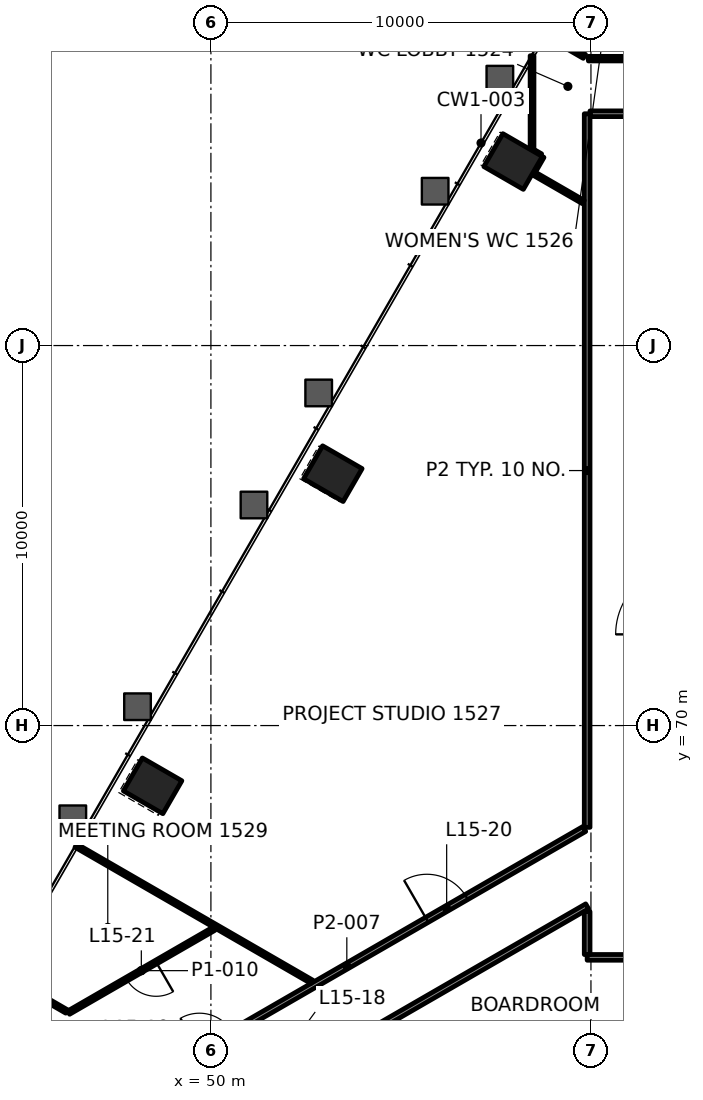
"""IFC4 building model, lengths in metres.
Left out: names, types, materials, properties, quantities, classifications, styles, units other than length and angle.
Written with IfcOpenShell. Run it as: python <this file> out.ifc"""

import sys

from ifc_helpers import new_model, si_unit, direction, frame, frame_2d, origin, origin_2d, place, context, subcontext, project, spatial, rectangle, extrude, element, fill, save


model = new_model("IFC4")
c1 = context("Model", 3, precision=1e-05, world=origin(), true_north=direction((0.0, 1.0)))
c2 = subcontext(c1, "Body", "Model", "MODEL_VIEW")
j1 = project(units=[si_unit("LENGTHUNIT", "METRE"), si_unit("PLANEANGLEUNIT", "RADIAN")], contexts=[c1])
p1 = place(None, origin())
s1 = spatial("IfcSite", under=j1, at=p1, CompositionType="ELEMENT")
p2 = place(p1, origin())
s2 = spatial("IfcBuilding", under=s1, at=p2, CompositionType="ELEMENT")
p3 = place(p2, frame((0.0, 0.0, 69.4)))
s3 = spatial("IfcBuildingStorey", under=s2, at=p3, CompositionType="ELEMENT", Elevation=69.4)
for number, where, z_axis, x_axis in (
    (1, (57.951, 84.843, -0.0), (0.0, 0.0, 1.0), (-0.5, -0.866, 0.0)),
    (2, (53.209, 76.628, -0.0), (0.0, 0.0, 1.0), (-0.5, -0.866, 0.0)),
    (3, (48.466, 68.414, -0.0), (0.0, 0.0, 1.0), (-0.5, -0.866, 0.0)),
):
    element("IfcColumn", number, at=place(p3, frame(where, z_axis=z_axis, x_axis=x_axis)), inside=s3, PredefinedType="COLUMN", context=c2, shape_type="SweptSolid", body=[
        extrude(rectangle(XDim=1.0, YDim=1.2, at=origin_2d()), origin(), (0.0, 0.0, 1.0), 4.2),
    ])
p4 = place(p3, frame((90.099, 63.9, 0.0), z_axis=(0.0, 0.0, 1.0), x_axis=(-1.0, 0.0, 0.0)))
e4 = element("IfcWall", 4, at=p4, inside=s3, PredefinedType="PARTITIONING", context=c2, shape_type="SweptSolid", body=[
    extrude(rectangle(XDim=30.199, YDim=0.15, at=frame_2d((15.1, 0.0))), origin(), (0.0, 0.0, 1.0), 3.4),
])
p5 = place(p4, frame((2.309, 0.0, 0.0)))
e5 = element("IfcOpeningElement", 5, at=p5, cuts=e4, PredefinedType="OPENING", context=c2, shape_type="SweptSolid", body=[
    extrude(rectangle(XDim=1.2, YDim=2.1, at=frame_2d((0.6, 1.05))), frame((0.0, 0.085, 0.0), z_axis=(0.0, -1.0, 0.0), x_axis=(1.0, 0.0, 0.0)), (0.0, 0.0, 1.0), 0.17),
])
p6 = place(p4, frame((14.599, 0.0, 0.0)))
e6 = element("IfcOpeningElement", 6, at=p6, cuts=e4, PredefinedType="OPENING", context=c2, shape_type="SweptSolid", body=[
    extrude(rectangle(XDim=1.0, YDim=2.1, at=frame_2d((0.5, 1.05))), frame((0.0, 0.085, 0.0), z_axis=(0.0, -1.0, 0.0), x_axis=(1.0, 0.0, 0.0)), (0.0, 0.0, 1.0), 0.17),
])
p7 = place(p4, frame((26.791, 0.0, 0.0)))
e7 = element("IfcOpeningElement", 7, at=p7, cuts=e4, PredefinedType="OPENING", context=c2, shape_type="SweptSolid", body=[
    extrude(rectangle(XDim=1.0, YDim=2.1, at=frame_2d((0.5, 1.05))), frame((0.0, 0.085, 0.0), z_axis=(0.0, -1.0, 0.0), x_axis=(1.0, 0.0, 0.0)), (0.0, 0.0, 1.0), 0.17),
])
p8 = place(p3, frame((59.976, 86.1, 0.0), z_axis=(0.0, 0.0, 1.0), x_axis=(1.0, 0.0, 0.0)))
e8 = element("IfcWall", 8, at=p8, inside=s3, PredefinedType="PARTITIONING", context=c2, shape_type="SweptSolid", body=[
    extrude(rectangle(XDim=9.649, YDim=0.15, at=frame_2d((4.825, 0.0))), origin(), (0.0, 0.0, 1.0), 3.4),
])
p9 = place(p8, frame((4.225, 0.0, 0.0)))
e9 = element("IfcOpeningElement", 9, at=p9, cuts=e8, PredefinedType="OPENING", context=c2, shape_type="SweptSolid", body=[
    extrude(rectangle(XDim=1.2, YDim=2.1, at=frame_2d((0.6, 1.05))), frame((0.0, 0.085, 0.0), z_axis=(0.0, -1.0, 0.0), x_axis=(1.0, 0.0, 0.0)), (0.0, 0.0, 1.0), 0.17),
])
p10 = place(p3, frame((67.181, 87.55, 0.0), z_axis=(0.0, 0.0, 1.0), x_axis=(-1.0, 0.0, 0.0)))
e10 = element("IfcWall", 10, at=p10, inside=s3, PredefinedType="PARTITIONING", context=c2, shape_type="SweptSolid", body=[
    extrude(rectangle(XDim=7.249, YDim=0.12, at=frame_2d((3.625, 0.0))), origin(), (0.0, 0.0, 1.0), 3.4),
])
p11 = place(p10, frame((1.388, 0.0, 0.0)))
e11 = element("IfcOpeningElement", 11, at=p11, cuts=e10, PredefinedType="OPENING", context=c2, shape_type="SweptSolid", body=[
    extrude(rectangle(XDim=0.9, YDim=2.1, at=frame_2d((0.45, 1.05))), frame((0.0, 0.07, 0.0), z_axis=(0.0, -1.0, 0.0), x_axis=(1.0, 0.0, 0.0)), (0.0, 0.0, 1.0), 0.14),
])
p12 = place(p10, frame((4.807, 0.0, 0.0)))
e12 = element("IfcOpeningElement", 12, at=p12, cuts=e10, PredefinedType="OPENING", context=c2, shape_type="SweptSolid", body=[
    extrude(rectangle(XDim=0.9, YDim=2.1, at=frame_2d((0.45, 1.05))), frame((0.0, 0.07, 0.0), z_axis=(0.0, -1.0, 0.0), x_axis=(1.0, 0.0, 0.0)), (0.0, 0.0, 1.0), 0.14),
])
p13 = place(p3, frame((59.9, 65.243, 0.0), z_axis=(0.0, 0.0, 1.0), x_axis=(-0.866023326939, -0.500003597184, 0.0)))
e13 = element("IfcWall", 13, at=p13, inside=s3, PredefinedType="PARTITIONING", context=c2, shape_type="SweptSolid", body=[
    extrude(rectangle(XDim=13.48, YDim=0.15, at=frame_2d((6.74, 0.0))), origin(), (0.0, 0.0, 1.0), 3.247),
])
p14 = place(p13, frame((9.643, 0.0, 0.0)))
e14 = element("IfcOpeningElement", 14, at=p14, cuts=e13, PredefinedType="OPENING", context=c2, shape_type="SweptSolid", body=[
    extrude(rectangle(XDim=1.2, YDim=2.1, at=frame_2d((0.6, 1.05))), frame((0.0, 0.085, 0.0), z_axis=(0.0, -1.0, 0.0), x_axis=(1.0, 0.0, 0.0)), (0.0, 0.0, 1.0), 0.17),
])
p15 = place(p3, frame((47.328, 60.063, 0.0), z_axis=(0.0, 0.0, 1.0), x_axis=(0.86602527873, 0.500000216601, 0.0)))
e15 = element("IfcWall", 15, at=p15, inside=s3, PredefinedType="PARTITIONING", context=c2, shape_type="SweptSolid", body=[
    extrude(rectangle(XDim=14.431, YDim=0.15, at=frame_2d((7.215, 0.0))), origin(), (0.0, 0.0, 1.0), 3.4),
])
p16 = place(p15, frame((2.737, 0.0, 0.0)))
e16 = element("IfcOpeningElement", 16, at=p16, cuts=e15, PredefinedType="OPENING", context=c2, shape_type="SweptSolid", body=[
    extrude(rectangle(XDim=1.0, YDim=2.1, at=frame_2d((0.5, 1.05))), frame((0.0, 0.085, 0.0), z_axis=(0.0, -1.0, 0.0), x_axis=(1.0, 0.0, 0.0)), (0.0, 0.0, 1.0), 0.17),
])
p17 = place(p15, frame((9.649, 0.0, 0.0)))
e17 = element("IfcOpeningElement", 17, at=p17, cuts=e15, PredefinedType="OPENING", context=c2, shape_type="SweptSolid", body=[
    extrude(rectangle(XDim=1.2, YDim=2.1, at=frame_2d((0.6, 1.05))), frame((0.0, 0.085, 0.0), z_axis=(0.0, -1.0, 0.0), x_axis=(1.0, 0.0, 0.0)), (0.0, 0.0, 1.0), 0.17),
])
p18 = place(p3, frame((50.082, 64.655, 0.0), z_axis=(0.0, 0.0, 1.0), x_axis=(-0.866030989016, -0.499990325971, 0.0)))
e18 = element("IfcWall", 18, at=p18, inside=s3, PredefinedType="PARTITIONING", context=c2, shape_type="SweptSolid", body=[
    extrude(rectangle(XDim=4.418, YDim=0.1, at=frame_2d((2.209, 0.0))), origin(), (0.0, 0.0, 1.0), 3.4),
])
p19 = place(p18, frame((1.759, 0.0, 0.0)))
e19 = element("IfcOpeningElement", 19, at=p19, cuts=e18, PredefinedType="OPENING", context=c2, shape_type="SweptSolid", body=[
    extrude(rectangle(XDim=0.9, YDim=2.1, at=frame_2d((0.45, 1.05))), frame((0.0, 0.06, 0.0), z_axis=(0.0, -1.0, 0.0), x_axis=(1.0, 0.0, 0.0)), (0.0, 0.0, 1.0), 0.12),
])
p20 = place(p3, frame((58.496, 84.587, 0.0), z_axis=(0.0, 0.0, 1.0), x_axis=(0.500114568548, 0.865959247497, 0.0)))
e20 = element("IfcWall", 20, at=p20, inside=s3, PredefinedType="PARTITIONING", context=c2, shape_type="SweptSolid", body=[
    extrude(rectangle(XDim=0.449, YDim=0.1, at=frame_2d((0.225, 0.0))), origin(), (0.0, 0.0, 1.0), 3.4),
])
p21 = place(p3, frame((59.9, 63.975, 0.0), z_axis=(0.0, 0.0, 1.0), x_axis=(0.0, 1.0, 0.0)))
e21 = element("IfcWall", 21, at=p21, inside=s3, PredefinedType="PARTITIONING", context=c2, shape_type="SweptSolid", body=[
    extrude(rectangle(XDim=1.131, YDim=0.15, at=frame_2d((0.565, 0.0))), origin(), (0.0, 0.0, 1.0), 3.247),
])
p22 = place(p3, frame((59.9, 67.321, 0.0), z_axis=(0.0, 0.0, 1.0), x_axis=(0.0, 1.0, 0.0)))
e22 = element("IfcWall", 22, at=p22, inside=s3, PredefinedType="PARTITIONING", context=c2, shape_type="SweptSolid", body=[
    extrude(rectangle(XDim=18.778, YDim=0.15, at=frame_2d((9.389, 0.0))), origin(), (0.0, 0.0, 1.0), 3.4),
])
p23 = place(p3, frame((58.45, 85.133, 0.0), z_axis=(0.0, 0.0, 1.0), x_axis=(0.0, 1.0, 0.0)))
e23 = element("IfcWall", 23, at=p23, inside=s3, PredefinedType="PARTITIONING", context=c2, shape_type="SweptSolid", body=[
    extrude(rectangle(XDim=2.494, YDim=0.1, at=frame_2d((1.247, 0.0))), origin(), (0.0, 0.0, 1.0), 3.165),
])
p24 = place(p3, frame((69.573, 86.348, 0.0), z_axis=(0.0, 0.0, 1.0), x_axis=(-0.866024495625, 0.500001572974, 0.0)))
e24 = element("IfcWall", 24, at=p24, inside=s3, PredefinedType="PARTITIONING", context=c2, shape_type="SweptSolid", body=[
    extrude(rectangle(XDim=10.272, YDim=0.2, at=frame_2d((5.136, 0.0))), origin(), (0.0, 0.0, 1.0), 3.165),
])
p25 = place(p3, frame((63.512, 87.665, 0.0), z_axis=(0.0, 0.0, 1.0), x_axis=(-0.866014185868, 0.500019429497, 0.0)))
e25 = element("IfcWall", 25, at=p25, inside=s3, PredefinedType="PARTITIONING", context=c2, shape_type="SweptSolid", body=[
    extrude(rectangle(XDim=4.365, YDim=0.12, at=frame_2d((2.182, 0.0))), origin(), (0.0, 0.0, 1.0), 3.165),
])
p26 = place(p3, frame((59.828, 87.61, 0.0), z_axis=(0.0, 0.0, 1.0), x_axis=(-0.865996090227, 0.500050769134, 0.0)))
e26 = element("IfcWall", 26, at=p26, inside=s3, PredefinedType="PARTITIONING", context=c2, shape_type="SweptSolid", body=[
    extrude(rectangle(XDim=1.202, YDim=0.12, at=frame_2d((0.601, 0.0))), origin(), (0.0, 0.0, 1.0), 3.165),
])
p27 = place(p3, frame((58.677, 85.001, 0.0), z_axis=(0.0, 0.0, 1.0), x_axis=(-0.86610613113, 0.49986015006, 0.0)))
e27 = element("IfcWall", 27, at=p27, inside=s3, PredefinedType="PARTITIONING", context=c2, shape_type="SweptSolid", body=[
    extrude(rectangle(XDim=0.205, YDim=0.1, at=frame_2d((0.102, 0.0))), origin(), (0.0, 0.0, 1.0), 3.4),
])
p28 = place(p3, frame((59.799, 83.776, 0.0), z_axis=(0.0, 0.0, 1.0), x_axis=(-0.866029087811, 0.499993619025, 0.0)))
e28 = element("IfcWall", 28, at=p28, inside=s3, PredefinedType="PARTITIONING", context=c2, shape_type="SweptSolid", body=[
    extrude(rectangle(XDim=1.533, YDim=0.1, at=frame_2d((0.766, 0.0))), origin(), (0.0, 0.0, 1.0), 3.4),
])
p29 = place(p3, frame((52.657, 63.256, 0.0), z_axis=(0.0, 0.0, 1.0), x_axis=(-0.866014863173, 0.50001825643, 0.0)))
e29 = element("IfcWall", 29, at=p29, inside=s3, PredefinedType="PARTITIONING", context=c2, shape_type="SweptSolid", body=[
    extrude(rectangle(XDim=7.168, YDim=0.1, at=frame_2d((3.584, 0.0))), origin(), (0.0, 0.0, 1.0), 3.4),
])
p30 = place(p3, frame((46.206, 62.475, 0.0), z_axis=(0.0, 0.0, 1.0), x_axis=(-0.866033041146, 0.499986771468, 0.0)))
e30 = element("IfcWall", 30, at=p30, inside=s3, PredefinedType="PARTITIONING", context=c2, shape_type="SweptSolid", body=[
    extrude(rectangle(XDim=1.972, YDim=0.1, at=frame_2d((0.986, 0.0))), origin(), (0.0, 0.0, 1.0), 3.4),
])
p31 = place(p17, origin())
e31 = element("IfcDoor", 31, at=p31, inside=s3, OperationType="DOUBLE_DOOR_SINGLE_SWING", PredefinedType="DOOR", context=c2, shape_type="SweptSolid", body=[
    extrude(rectangle(XDim=1.2, YDim=2.1, at=frame_2d((0.6, 1.05))), frame((0.0, 0.025, 0.0), z_axis=(0.0, -1.0, 0.0), x_axis=(1.0, 0.0, 0.0)), (0.0, 0.0, 1.0), 0.05),
])
fill(e17, e31)
p32 = place(p19, origin())
e32 = element("IfcDoor", 32, at=p32, inside=s3, OperationType="SINGLE_SWING_LEFT", PredefinedType="DOOR", context=c2, shape_type="SweptSolid", body=[
    extrude(rectangle(XDim=0.9, YDim=2.1, at=frame_2d((0.45, 1.05))), frame((0.0, 0.025, 0.0), z_axis=(0.0, -1.0, 0.0), x_axis=(1.0, 0.0, 0.0)), (0.0, 0.0, 1.0), 0.05),
])
fill(e19, e32)
save(model, sys.argv[1])
